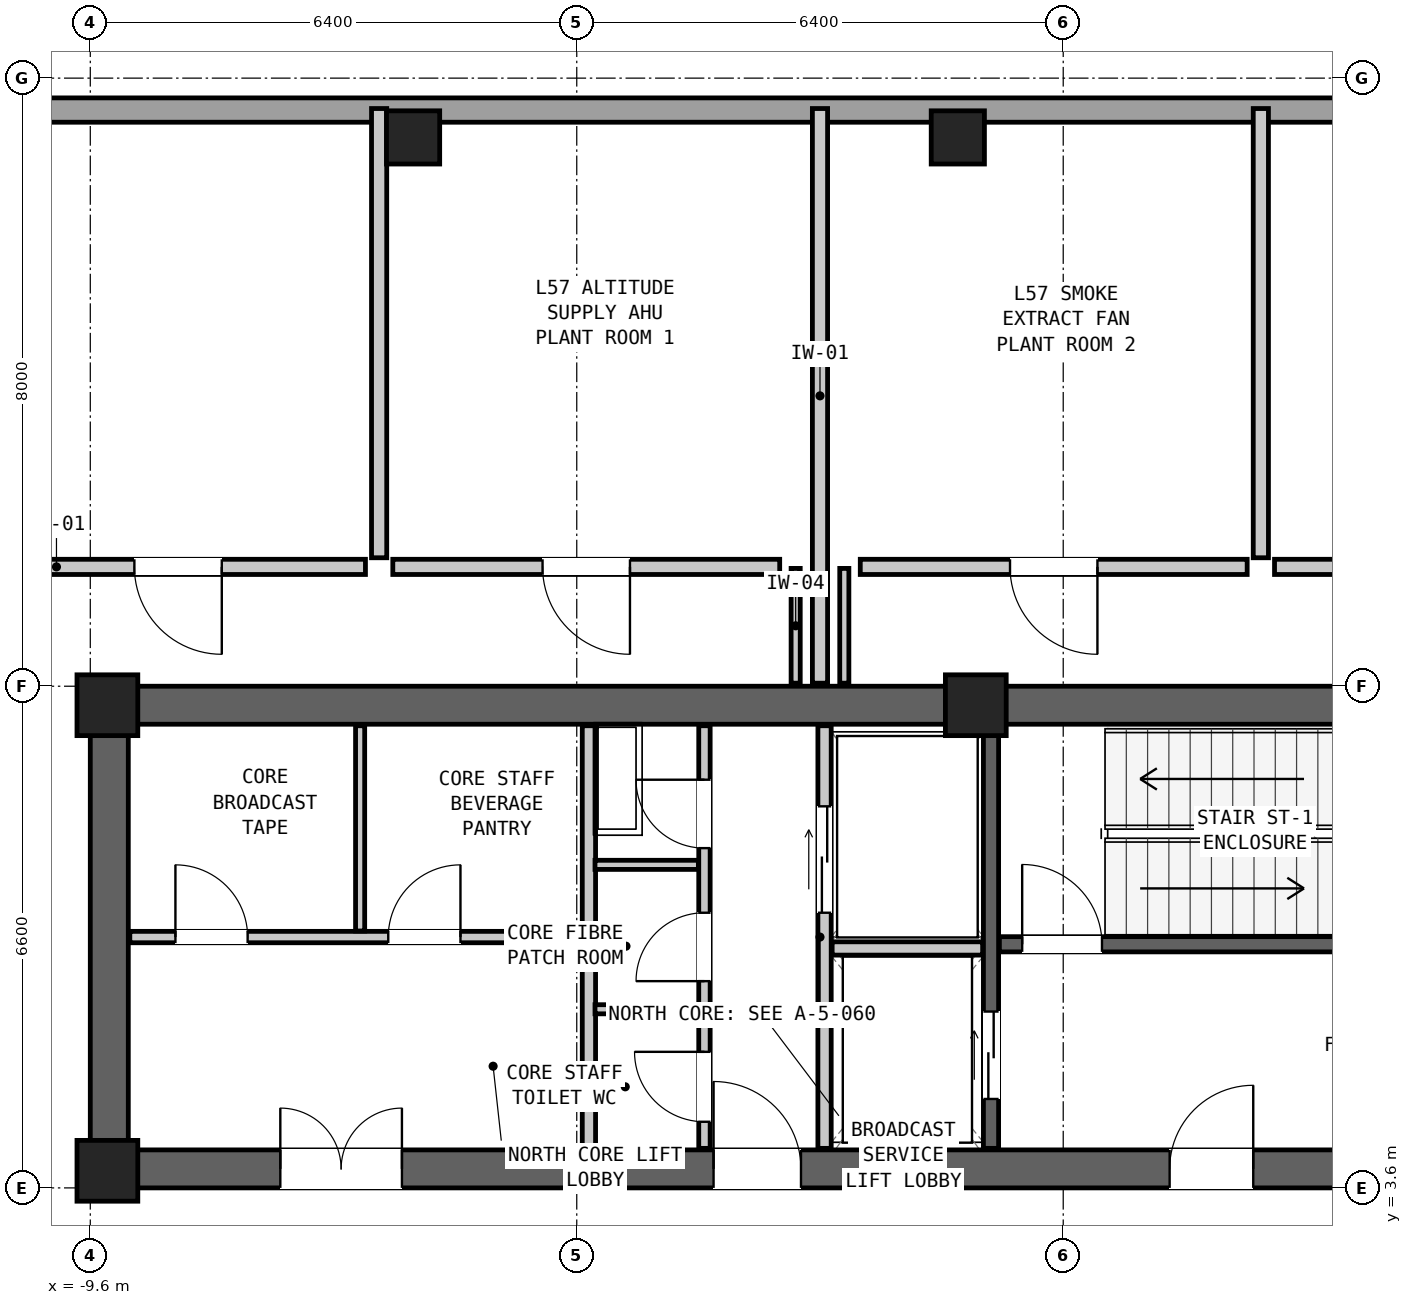
"""IFC4 building model, lengths in metres.
Left out: names, types, materials, properties, quantities, classifications, styles, units other than length and angle.
Written with IfcOpenShell. Run it as: python <this file> out.ifc"""

import sys

from ifc_helpers import new_model, si_unit, direction, frame, frame_2d, origin, origin_2d, place, context, subcontext, project, spatial, rectangle, hollow_rectangle, extrude, element, fill, save


model = new_model("IFC4")
c1 = context("Model", 3, precision=1e-05, world=origin(), true_north=direction((0.0, 1.0)))
c2 = subcontext(c1, "Body", "Model", "MODEL_VIEW")
j1 = project(units=[si_unit("LENGTHUNIT", "METRE"), si_unit("PLANEANGLEUNIT", "RADIAN")], contexts=[c1])
p1 = place(None, origin())
s1 = spatial("IfcSite", under=j1, at=p1, CompositionType="ELEMENT")
p2 = place(p1, origin())
s2 = spatial("IfcBuilding", under=s1, at=p2, CompositionType="ELEMENT")
p3 = place(p2, frame((0.0, 0.0, 195.15)))
s3 = spatial("IfcBuildingStorey", under=s2, at=p3, CompositionType="ELEMENT", Elevation=195.15)
p4 = place(p3, frame((-9.6, 9.95, 0.0), z_axis=(0.0, 0.0, 1.0), x_axis=(1.0, 0.0, 0.0)))
e1 = element("IfcWall", 1, at=p4, inside=s3, PredefinedType="SHEAR", context=c2, shape_type="SweptSolid", body=[
    extrude(rectangle(XDim=19.2, YDim=0.5, at=frame_2d((9.6, 0.0))), origin(), (0.0, 0.0, 1.0), 4.35),
])
p5 = place(p3, frame((-9.6, 3.85, 0.0), z_axis=(0.0, 0.0, 1.0), x_axis=(1.0, 0.0, 0.0)))
e2 = element("IfcWall", 2, at=p5, inside=s3, PredefinedType="SHEAR", context=c2, shape_type="SweptSolid", body=[
    extrude(rectangle(XDim=19.2, YDim=0.5, at=frame_2d((9.6, 0.0))), origin(), (0.0, 0.0, 1.0), 4.35),
])
p6 = place(p5, frame((14.2, 0.0, 0.0)))
e3 = element("IfcOpeningElement", 3, at=p6, cuts=e2, PredefinedType="OPENING", context=c2, shape_type="SweptSolid", body=[
    extrude(rectangle(XDim=1.1, YDim=2.08, at=frame_2d((0.55, 1.04))), frame((0.0, 0.262, 0.0), z_axis=(0.0, -1.0, 0.0), x_axis=(1.0, 0.0, 0.0)), (0.0, 0.0, 1.0), 0.524),
])
p7 = place(p5, frame((8.2, 0.0, 0.0)))
e4 = element("IfcOpeningElement", 4, at=p7, cuts=e2, PredefinedType="OPENING", context=c2, shape_type="SweptSolid", body=[
    extrude(rectangle(XDim=1.15, YDim=2.1, at=frame_2d((0.575, 1.05))), frame((0.0, 0.262, 0.0), z_axis=(0.0, -1.0, 0.0), x_axis=(1.0, 0.0, 0.0)), (0.0, 0.0, 1.0), 0.524),
])
p8 = place(p5, frame((2.5, 0.0, 0.0)))
e5 = element("IfcOpeningElement", 5, at=p8, cuts=e2, PredefinedType="OPENING", context=c2, shape_type="SweptSolid", body=[
    extrude(rectangle(XDim=1.6, YDim=2.12, at=frame_2d((0.8, 1.06))), frame((0.0, 0.262, 0.0), z_axis=(0.0, -1.0, 0.0), x_axis=(1.0, 0.0, 0.0)), (0.0, 0.0, 1.0), 0.524),
])
p9 = place(p3, frame((-9.35, 3.6, 0.0), z_axis=(0.0, 0.0, 1.0), x_axis=(0.0, 1.0, 0.0)))
e6 = element("IfcWall", 6, at=p9, inside=s3, PredefinedType="SHEAR", context=c2, shape_type="SweptSolid", body=[
    extrude(rectangle(XDim=6.6, YDim=0.5, at=frame_2d((3.3, 0.0))), origin(), (0.0, 0.0, 1.0), 4.35),
])
for number, where, z_axis, x_axis in (
    (7, (1.813, 17.42, 0.0), (0.0, 0.0, 1.0), (1.0, 0.0, 0.0)),
    (8, (-5.353, 17.42, 0.0), (0.0, 0.0, 1.0), (1.0, 0.0, 0.0)),
):
    element("IfcColumn", number, at=place(p3, frame(where, z_axis=z_axis, x_axis=x_axis)), inside=s3, PredefinedType="COLUMN", context=c2, shape_type="SweptSolid", body=[
        extrude(hollow_rectangle(XDim=0.7, YDim=0.7, WallThickness=0.045, at=origin_2d()), origin(), (0.0, 0.0, 1.0), 4.35),
    ])
for number, where, z_axis, x_axis in (
    (9, (-9.375, 9.95, 0.0), (0.0, 0.0, 1.0), (1.0, 0.0, 0.0)),
    (10, (2.05, 9.95, 0.0), (0.0, 0.0, 1.0), (1.0, 0.0, 0.0)),
    (11, (-9.375, 3.825, 0.0), (0.0, 0.0, 1.0), (1.0, 0.0, 0.0)),
):
    element("IfcColumn", number, at=place(p3, frame(where, z_axis=z_axis, x_axis=x_axis)), inside=s3, PredefinedType="COLUMN", context=c2, shape_type="SweptSolid", body=[
        extrude(rectangle(XDim=0.8, YDim=0.8, at=origin_2d()), origin(), (0.0, 0.0, 1.0), 4.35),
    ])
p10 = place(p3, frame((-12.182, 17.78, 0.0), z_axis=(0.0, 0.0, 1.0), x_axis=(1.0, 0.0, 0.0)))
e12 = element("IfcWall", 12, at=p10, inside=s3, PredefinedType="SOLIDWALL", context=c2, shape_type="SweptSolid", body=[
    extrude(rectangle(XDim=20.824, YDim=0.32, at=frame_2d((10.412, 0.0))), origin(), (0.0, 0.0, 1.0), 2.34),
])
p11 = place(p3, frame((2.36, 6.805, 0.0), z_axis=(0.0, 0.0, 1.0), x_axis=(1.0, 0.0, 0.0)))
e13 = element("IfcWall", 13, at=p11, inside=s3, PredefinedType="SHEAR", context=c2, shape_type="SweptSolid", body=[
    extrude(rectangle(XDim=6.72, YDim=0.2, at=frame_2d((3.36, 0.0))), origin(), (0.0, 0.0, 1.0), 4.16),
])
p12 = place(p11, frame((0.3, 0.0, 0.0)))
e14 = element("IfcOpeningElement", 14, at=p12, cuts=e13, PredefinedType="OPENING", context=c2, shape_type="SweptSolid", body=[
    extrude(rectangle(XDim=1.05, YDim=2.08, at=frame_2d((0.525, 1.04))), frame((0.0, 0.112, 0.0), z_axis=(0.0, -1.0, 0.0), x_axis=(1.0, 0.0, 0.0)), (0.0, 0.0, 1.0), 0.224),
])
p13 = place(p3, frame((2.25, 4.12, 0.0), z_axis=(0.0, 0.0, 1.0), x_axis=(0.0, 1.0, 0.0)))
e15 = element("IfcWall", 15, at=p13, inside=s3, PredefinedType="SHEAR", context=c2, shape_type="SweptSolid", body=[
    extrude(rectangle(XDim=5.56, YDim=0.2, at=frame_2d((2.78, 0.0))), origin(), (0.0, 0.0, 1.0), 4.16),
])
p14 = place(p13, frame((0.65, 0.0, 0.0)))
e16 = element("IfcOpeningElement", 16, at=p14, cuts=e15, PredefinedType="OPENING", context=c2, shape_type="SweptSolid", body=[
    extrude(rectangle(XDim=1.15, YDim=2.08, at=frame_2d((0.575, 1.04))), frame((0.0, 0.112, 0.0), z_axis=(0.0, -1.0, 0.0), x_axis=(1.0, 0.0, 0.0)), (0.0, 0.0, 1.0), 0.224),
])
p15 = place(p3, frame((0.06, 4.12, 0.0), z_axis=(0.0, 0.0, 1.0), x_axis=(0.0, 1.0, 0.0)))
e17 = element("IfcWall", 17, at=p15, inside=s3, PredefinedType="PARTITIONING", context=c2, shape_type="SweptSolid", body=[
    extrude(rectangle(XDim=5.56, YDim=0.175, at=frame_2d((2.78, 0.0))), origin(), (0.0, 0.0, 1.0), 4.16),
])
p16 = place(p15, frame((3.1, 0.0, 0.0)))
e18 = element("IfcOpeningElement", 18, at=p16, cuts=e17, PredefinedType="OPENING", context=c2, shape_type="SweptSolid", body=[
    extrude(rectangle(XDim=1.4, YDim=2.12, at=frame_2d((0.7, 1.06))), frame((0.0, 0.1, 0.0), z_axis=(0.0, -1.0, 0.0), x_axis=(1.0, 0.0, 0.0)), (0.0, 0.0, 1.0), 0.199),
])
p17 = place(p3, frame((0.16, 6.75, 0.0), z_axis=(0.0, 0.0, 1.0), x_axis=(1.0, 0.0, 0.0)))
e19 = element("IfcWall", 19, at=p17, inside=s3, PredefinedType="PARTITIONING", context=c2, shape_type="SweptSolid", body=[
    extrude(rectangle(XDim=1.98, YDim=0.175, at=frame_2d((0.99, 0.0))), origin(), (0.0, 0.0, 1.0), 4.16),
])
p18 = place(p3, frame((-3.04, 4.12, 0.0), z_axis=(0.0, 0.0, 1.0), x_axis=(0.0, 1.0, 0.0)))
e20 = element("IfcWall", 20, at=p18, inside=s3, PredefinedType="PARTITIONING", context=c2, shape_type="SweptSolid", body=[
    extrude(rectangle(XDim=5.56, YDim=0.175, at=frame_2d((2.78, 0.0))), origin(), (0.0, 0.0, 1.0), 4.16),
])
p19 = place(p3, frame((-1.52, 4.12, 0.0), z_axis=(0.0, 0.0, 1.0), x_axis=(0.0, 1.0, 0.0)))
e21 = element("IfcWall", 21, at=p19, inside=s3, PredefinedType="PARTITIONING", context=c2, shape_type="SweptSolid", body=[
    extrude(rectangle(XDim=5.56, YDim=0.15, at=frame_2d((2.78, 0.0))), origin(), (0.0, 0.0, 1.0), 4.16),
])
p20 = place(p19, frame((3.95, 0.0, 0.0)))
e22 = element("IfcOpeningElement", 22, at=p20, cuts=e21, PredefinedType="OPENING", context=c2, shape_type="SweptSolid", body=[
    extrude(rectangle(XDim=0.9, YDim=2.05, at=frame_2d((0.45, 1.025))), frame((0.0, 0.087, 0.0), z_axis=(0.0, -1.0, 0.0), x_axis=(1.0, 0.0, 0.0)), (0.0, 0.0, 1.0), 0.174),
])
p21 = place(p19, frame((2.2, 0.0, 0.0)))
e23 = element("IfcOpeningElement", 23, at=p21, cuts=e21, PredefinedType="OPENING", context=c2, shape_type="SweptSolid", body=[
    extrude(rectangle(XDim=0.9, YDim=2.05, at=frame_2d((0.45, 1.025))), frame((0.0, 0.087, 0.0), z_axis=(0.0, -1.0, 0.0), x_axis=(1.0, 0.0, 0.0)), (0.0, 0.0, 1.0), 0.174),
])
p22 = place(p19, frame((0.35, 0.0, 0.0)))
e24 = element("IfcOpeningElement", 24, at=p22, cuts=e21, PredefinedType="OPENING", context=c2, shape_type="SweptSolid", body=[
    extrude(rectangle(XDim=0.92, YDim=2.1, at=frame_2d((0.46, 1.05))), frame((0.0, 0.087, 0.0), z_axis=(0.0, -1.0, 0.0), x_axis=(1.0, 0.0, 0.0)), (0.0, 0.0, 1.0), 0.174),
])
for number, where, z_axis, x_axis in (
    (25, (-2.96, 5.95, 0.0), (0.0, 0.0, 1.0), (1.0, 0.0, 0.0)),
    (26, (-2.96, 7.85, 0.0), (0.0, 0.0, 1.0), (1.0, 0.0, 0.0)),
):
    element("IfcWall", number, at=place(p3, frame(where, z_axis=z_axis, x_axis=x_axis)), inside=s3, PredefinedType="PARTITIONING", context=c2, shape_type="SweptSolid", body=[
        extrude(rectangle(XDim=1.36, YDim=0.12, at=frame_2d((0.68, 0.0))), origin(), (0.0, 0.0, 1.0), 4.16),
    ])
p23 = place(p3, frame((-9.08, 6.9, 0.0), z_axis=(0.0, 0.0, 1.0), x_axis=(1.0, 0.0, 0.0)))
e27 = element("IfcWall", 27, at=p23, inside=s3, PredefinedType="PARTITIONING", context=c2, shape_type="SweptSolid", body=[
    extrude(rectangle(XDim=5.96, YDim=0.15, at=frame_2d((2.98, 0.0))), origin(), (0.0, 0.0, 1.0), 4.16),
])
p24 = place(p23, frame((0.6, 0.0, 0.0)))
e28 = element("IfcOpeningElement", 28, at=p24, cuts=e27, PredefinedType="OPENING", context=c2, shape_type="SweptSolid", body=[
    extrude(rectangle(XDim=0.95, YDim=2.1, at=frame_2d((0.475, 1.05))), frame((0.0, 0.087, 0.0), z_axis=(0.0, -1.0, 0.0), x_axis=(1.0, 0.0, 0.0)), (0.0, 0.0, 1.0), 0.174),
])
p25 = place(p23, frame((3.4, 0.0, 0.0)))
e29 = element("IfcOpeningElement", 29, at=p25, cuts=e27, PredefinedType="OPENING", context=c2, shape_type="SweptSolid", body=[
    extrude(rectangle(XDim=0.95, YDim=2.1, at=frame_2d((0.475, 1.05))), frame((0.0, 0.087, 0.0), z_axis=(0.0, -1.0, 0.0), x_axis=(1.0, 0.0, 0.0)), (0.0, 0.0, 1.0), 0.174),
])
p26 = place(p3, frame((-6.05, 6.98, 0.0), z_axis=(0.0, 0.0, 1.0), x_axis=(0.0, 1.0, 0.0)))
e30 = element("IfcWall", 30, at=p26, inside=s3, PredefinedType="PARTITIONING", context=c2, shape_type="SweptSolid", body=[
    extrude(rectangle(XDim=2.7, YDim=0.12, at=frame_2d((1.35, 0.0))), origin(), (0.0, 0.0, 1.0), 4.16),
])
p27 = place(p3, frame((0.0, 10.24, 0.0), z_axis=(0.0, 0.0, 1.0), x_axis=(0.0, 1.0, 0.0)))
e31 = element("IfcWall", 31, at=p27, inside=s3, PredefinedType="PARTITIONING", context=c2, shape_type="SweptSolid", body=[
    extrude(rectangle(XDim=7.56, YDim=0.2, at=frame_2d((3.78, 0.0))), origin(), (0.0, 0.0, 1.0), 2.34),
])
for number, where, z_axis, x_axis in (
    (32, (-0.32, 10.24, 0.0), (0.0, 0.0, 1.0), (0.0, 1.0, 0.0)),
    (33, (0.32, 10.24, 0.0), (0.0, 0.0, 1.0), (0.0, 1.0, 0.0)),
):
    element("IfcWall", number, at=place(p3, frame(where, z_axis=z_axis, x_axis=x_axis)), inside=s3, PredefinedType="PARTITIONING", context=c2, shape_type="SweptSolid", body=[
        extrude(rectangle(XDim=1.51, YDim=0.12, at=frame_2d((0.755, 0.0))), origin(), (0.0, 0.0, 1.0), 2.34),
    ])
p28 = place(p3, frame((-5.98, 11.77, 0.0), z_axis=(0.0, 0.0, 1.0), x_axis=(-1.0, 0.0, 0.0)))
e34 = element("IfcWall", 34, at=p28, inside=s3, PredefinedType="PARTITIONING", context=c2, shape_type="SweptSolid", body=[
    extrude(rectangle(XDim=4.99, YDim=0.2, at=frame_2d((2.495, 0.0))), origin(), (0.0, 0.0, 1.0), 4.16),
])
p29 = place(p28, frame((1.89, 0.0, 0.0)))
e35 = element("IfcOpeningElement", 35, at=p29, cuts=e34, PredefinedType="OPENING", context=c2, shape_type="SweptSolid", body=[
    extrude(rectangle(XDim=1.15, YDim=2.1, at=frame_2d((0.575, 1.05))), frame((0.0, 0.112, 0.0), z_axis=(0.0, -1.0, 0.0), x_axis=(1.0, 0.0, 0.0)), (0.0, 0.0, 1.0), 0.224),
])
p30 = place(p3, frame((-5.8, 11.89, 0.0), z_axis=(0.0, 0.0, 1.0), x_axis=(0.0, 1.0, 0.0)))
e36 = element("IfcWall", 36, at=p30, inside=s3, PredefinedType="PARTITIONING", context=c2, shape_type="SweptSolid", body=[
    extrude(rectangle(XDim=5.91, YDim=0.2, at=frame_2d((2.955, 0.0))), origin(), (0.0, 0.0, 1.0), 3.681),
])
p31 = place(p3, frame((-0.53, 11.77, 0.0), z_axis=(0.0, 0.0, 1.0), x_axis=(-1.0, 0.0, 0.0)))
e37 = element("IfcWall", 37, at=p31, inside=s3, PredefinedType="PARTITIONING", context=c2, shape_type="SweptSolid", body=[
    extrude(rectangle(XDim=5.09, YDim=0.2, at=frame_2d((2.545, 0.0))), origin(), (0.0, 0.0, 1.0), 4.16),
])
p32 = place(p31, frame((1.97, 0.0, 0.0)))
e38 = element("IfcOpeningElement", 38, at=p32, cuts=e37, PredefinedType="OPENING", context=c2, shape_type="SweptSolid", body=[
    extrude(rectangle(XDim=1.15, YDim=2.1, at=frame_2d((0.575, 1.05))), frame((0.0, 0.112, 0.0), z_axis=(0.0, -1.0, 0.0), x_axis=(1.0, 0.0, 0.0)), (0.0, 0.0, 1.0), 0.224),
])
p33 = place(p3, frame((5.62, 11.77, 0.0), z_axis=(0.0, 0.0, 1.0), x_axis=(-1.0, 0.0, 0.0)))
e39 = element("IfcWall", 39, at=p33, inside=s3, PredefinedType="PARTITIONING", context=c2, shape_type="SweptSolid", body=[
    extrude(rectangle(XDim=5.09, YDim=0.2, at=frame_2d((2.545, 0.0))), origin(), (0.0, 0.0, 1.0), 4.16),
])
p34 = place(p33, frame((1.97, 0.0, 0.0)))
e40 = element("IfcOpeningElement", 40, at=p34, cuts=e39, PredefinedType="OPENING", context=c2, shape_type="SweptSolid", body=[
    extrude(rectangle(XDim=1.15, YDim=2.1, at=frame_2d((0.575, 1.05))), frame((0.0, 0.112, 0.0), z_axis=(0.0, -1.0, 0.0), x_axis=(1.0, 0.0, 0.0)), (0.0, 0.0, 1.0), 0.224),
])
p35 = place(p3, frame((5.8, 11.89, 0.0), z_axis=(0.0, 0.0, 1.0), x_axis=(0.0, 1.0, 0.0)))
e41 = element("IfcWall", 41, at=p35, inside=s3, PredefinedType="PARTITIONING", context=c2, shape_type="SweptSolid", body=[
    extrude(rectangle(XDim=5.91, YDim=0.2, at=frame_2d((2.955, 0.0))), origin(), (0.0, 0.0, 1.0), 3.681),
])
p36 = place(p3, frame((10.97, 11.77, 0.0), z_axis=(0.0, 0.0, 1.0), x_axis=(-1.0, 0.0, 0.0)))
e42 = element("IfcWall", 42, at=p36, inside=s3, PredefinedType="PARTITIONING", context=c2, shape_type="SweptSolid", body=[
    extrude(rectangle(XDim=4.99, YDim=0.2, at=frame_2d((2.495, 0.0))), origin(), (0.0, 0.0, 1.0), 2.34),
])
p37 = place(p36, frame((1.92, 0.0, 0.0)))
e43 = element("IfcOpeningElement", 43, at=p37, cuts=e42, PredefinedType="OPENING", context=c2, shape_type="SweptSolid", body=[
    extrude(rectangle(XDim=1.15, YDim=2.1, at=frame_2d((0.575, 1.05))), frame((0.0, 0.112, 0.0), z_axis=(0.0, -1.0, 0.0), x_axis=(1.0, 0.0, 0.0)), (0.0, 0.0, 1.0), 0.224),
])
p38 = place(p12, origin())
e44 = element("IfcDoor", 44, at=p38, inside=s3, OperationType="SINGLE_SWING_LEFT", PredefinedType="DOOR", context=c2, shape_type="SweptSolid", body=[
    extrude(rectangle(XDim=1.05, YDim=2.08, at=frame_2d((0.525, 1.04))), frame((0.0, 0.025, 0.0), z_axis=(0.0, -1.0, 0.0), x_axis=(1.0, 0.0, 0.0)), (0.0, 0.0, 1.0), 0.05),
])
fill(e14, e44)
p39 = place(p6, origin())
e45 = element("IfcDoor", 45, at=p39, inside=s3, OperationType="SINGLE_SWING_RIGHT", PredefinedType="DOOR", context=c2, shape_type="SweptSolid", body=[
    extrude(rectangle(XDim=1.1, YDim=2.08, at=frame_2d((0.55, 1.04))), frame((0.0, 0.025, 0.0), z_axis=(0.0, -1.0, 0.0), x_axis=(1.0, 0.0, 0.0)), (0.0, 0.0, 1.0), 0.05),
])
fill(e3, e45)
p40 = place(p14, origin())
e46 = element("IfcDoor", 46, at=p40, inside=s3, OperationType="DOUBLE_DOOR_SLIDING", PredefinedType="DOOR", context=c2, shape_type="SweptSolid", body=[
    extrude(rectangle(XDim=1.15, YDim=2.08, at=frame_2d((0.575, 1.04))), frame((0.0, 0.025, 0.0), z_axis=(0.0, -1.0, 0.0), x_axis=(1.0, 0.0, 0.0)), (0.0, 0.0, 1.0), 0.05),
])
fill(e16, e46)
p41 = place(p16, origin())
e47 = element("IfcDoor", 47, at=p41, inside=s3, OperationType="DOUBLE_DOOR_SLIDING", PredefinedType="DOOR", context=c2, shape_type="SweptSolid", body=[
    extrude(rectangle(XDim=1.4, YDim=2.12, at=frame_2d((0.7, 1.06))), frame((0.0, 0.025, 0.0), z_axis=(0.0, -1.0, 0.0), x_axis=(1.0, 0.0, 0.0)), (0.0, 0.0, 1.0), 0.05),
])
fill(e18, e47)
p42 = place(p7, origin())
e48 = element("IfcDoor", 48, at=p42, inside=s3, OperationType="SINGLE_SWING_LEFT", PredefinedType="DOOR", context=c2, shape_type="SweptSolid", body=[
    extrude(rectangle(XDim=1.15, YDim=2.1, at=frame_2d((0.575, 1.05))), frame((0.0, 0.025, 0.0), z_axis=(0.0, -1.0, 0.0), x_axis=(1.0, 0.0, 0.0)), (0.0, 0.0, 1.0), 0.05),
])
fill(e4, e48)
p43 = place(p20, origin())
e49 = element("IfcDoor", 49, at=p43, inside=s3, OperationType="SINGLE_SWING_RIGHT", PredefinedType="DOOR", context=c2, shape_type="SweptSolid", body=[
    extrude(rectangle(XDim=0.9, YDim=2.05, at=frame_2d((0.45, 1.025))), frame((0.0, 0.025, 0.0), z_axis=(0.0, -1.0, 0.0), x_axis=(1.0, 0.0, 0.0)), (0.0, 0.0, 1.0), 0.05),
])
fill(e22, e49)
p44 = place(p21, origin())
e50 = element("IfcDoor", 50, at=p44, inside=s3, OperationType="SINGLE_SWING_LEFT", PredefinedType="DOOR", context=c2, shape_type="SweptSolid", body=[
    extrude(rectangle(XDim=0.9, YDim=2.05, at=frame_2d((0.45, 1.025))), frame((0.0, 0.025, 0.0), z_axis=(0.0, -1.0, 0.0), x_axis=(1.0, 0.0, 0.0)), (0.0, 0.0, 1.0), 0.05),
])
fill(e23, e50)
p45 = place(p22, origin())
e51 = element("IfcDoor", 51, at=p45, inside=s3, OperationType="SINGLE_SWING_RIGHT", PredefinedType="DOOR", context=c2, shape_type="SweptSolid", body=[
    extrude(rectangle(XDim=0.92, YDim=2.1, at=frame_2d((0.46, 1.05))), frame((0.0, 0.025, 0.0), z_axis=(0.0, -1.0, 0.0), x_axis=(1.0, 0.0, 0.0)), (0.0, 0.0, 1.0), 0.05),
])
fill(e24, e51)
p46 = place(p8, origin())
e52 = element("IfcDoor", 52, at=p46, inside=s3, OperationType="DOUBLE_DOOR_SINGLE_SWING", PredefinedType="DOOR", context=c2, shape_type="SweptSolid", body=[
    extrude(rectangle(XDim=1.6, YDim=2.12, at=frame_2d((0.8, 1.06))), frame((0.0, 0.025, 0.0), z_axis=(0.0, -1.0, 0.0), x_axis=(1.0, 0.0, 0.0)), (0.0, 0.0, 1.0), 0.05),
])
fill(e5, e52)
p47 = place(p24, origin())
e53 = element("IfcDoor", 53, at=p47, inside=s3, OperationType="SINGLE_SWING_LEFT", PredefinedType="DOOR", context=c2, shape_type="SweptSolid", body=[
    extrude(rectangle(XDim=0.95, YDim=2.1, at=frame_2d((0.475, 1.05))), frame((0.0, 0.025, 0.0), z_axis=(0.0, -1.0, 0.0), x_axis=(1.0, 0.0, 0.0)), (0.0, 0.0, 1.0), 0.05),
])
fill(e28, e53)
p48 = place(p25, origin())
e54 = element("IfcDoor", 54, at=p48, inside=s3, OperationType="SINGLE_SWING_RIGHT", PredefinedType="DOOR", context=c2, shape_type="SweptSolid", body=[
    extrude(rectangle(XDim=0.95, YDim=2.1, at=frame_2d((0.475, 1.05))), frame((0.0, 0.025, 0.0), z_axis=(0.0, -1.0, 0.0), x_axis=(1.0, 0.0, 0.0)), (0.0, 0.0, 1.0), 0.05),
])
fill(e29, e54)
p49 = place(p29, origin())
e55 = element("IfcDoor", 55, at=p49, inside=s3, OperationType="SINGLE_SWING_LEFT", PredefinedType="DOOR", context=c2, shape_type="SweptSolid", body=[
    extrude(rectangle(XDim=1.15, YDim=2.1, at=frame_2d((0.575, 1.05))), frame((0.0, 0.025, 0.0), z_axis=(0.0, -1.0, 0.0), x_axis=(1.0, 0.0, 0.0)), (0.0, 0.0, 1.0), 0.05),
])
fill(e35, e55)
p50 = place(p32, origin())
e56 = element("IfcDoor", 56, at=p50, inside=s3, OperationType="SINGLE_SWING_LEFT", PredefinedType="DOOR", context=c2, shape_type="SweptSolid", body=[
    extrude(rectangle(XDim=1.15, YDim=2.1, at=frame_2d((0.575, 1.05))), frame((0.0, 0.025, 0.0), z_axis=(0.0, -1.0, 0.0), x_axis=(1.0, 0.0, 0.0)), (0.0, 0.0, 1.0), 0.05),
])
fill(e38, e56)
p51 = place(p34, origin())
e57 = element("IfcDoor", 57, at=p51, inside=s3, OperationType="SINGLE_SWING_LEFT", PredefinedType="DOOR", context=c2, shape_type="SweptSolid", body=[
    extrude(rectangle(XDim=1.15, YDim=2.1, at=frame_2d((0.575, 1.05))), frame((0.0, 0.025, 0.0), z_axis=(0.0, -1.0, 0.0), x_axis=(1.0, 0.0, 0.0)), (0.0, 0.0, 1.0), 0.05),
])
fill(e40, e57)
save(model, sys.argv[1])
